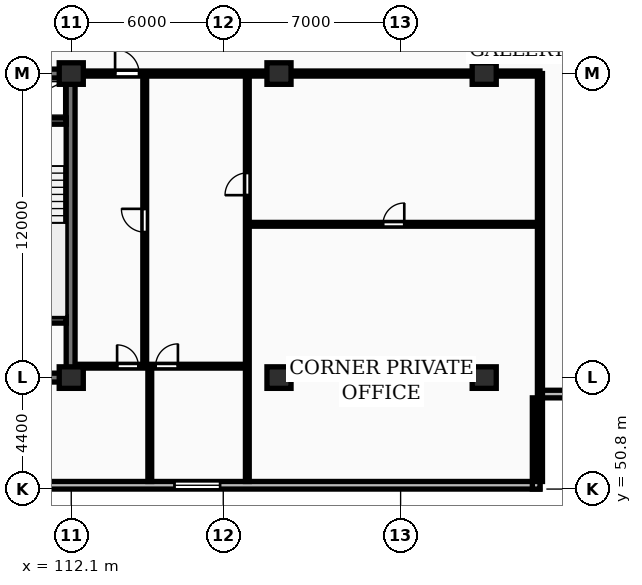
"""IFC4 building model, lengths in metres.
Left out: names, types, materials, properties, quantities, classifications, styles, units other than length and angle.
Written with IfcOpenShell. Run it as: python <this file> out.ifc"""

import sys

from ifc_helpers import new_model, si_unit, direction, frame, frame_2d, origin, origin_2d, place, context, subcontext, project, spatial, rectangle, extrude, element, fill, save


model = new_model("IFC4")
c1 = context("Model", 3, precision=1e-05, world=origin(), true_north=direction((0.0, 1.0)))
c2 = subcontext(c1, "Body", "Model", "MODEL_VIEW")
j1 = project(units=[si_unit("LENGTHUNIT", "METRE"), si_unit("PLANEANGLEUNIT", "RADIAN")], contexts=[c1])
p1 = place(None, origin())
s1 = spatial("IfcSite", under=j1, at=p1, CompositionType="ELEMENT")
p2 = place(p1, origin())
s2 = spatial("IfcBuilding", under=s1, at=p2, CompositionType="ELEMENT")
p3 = place(p2, frame((0.0, 0.0, 113.3)))
s3 = spatial("IfcBuildingStorey", under=s2, at=p3, CompositionType="ELEMENT", Elevation=113.3)
for number, where, z_axis, x_axis in (
    (1, (112.1, 55.2, 0.0), (0.0, 0.0, 1.0), (1.0, 0.0, 0.0)),
    (2, (112.1, 67.2, 0.0), (0.0, 0.0, 1.0), (1.0, 0.0, 0.0)),
    (3, (120.3, 55.2, 0.0), (0.0, 0.0, 1.0), (1.0, 0.0, 0.0)),
    (4, (120.3, 67.2, 0.0), (0.0, 0.0, 1.0), (1.0, 0.0, 0.0)),
    (5, (128.4, 55.2, 0.0), (0.0, 0.0, 1.0), (1.0, 0.0, 0.0)),
    (6, (128.4, 67.2, 0.0), (0.0, 0.0, 1.0), (1.0, 0.0, 0.0)),
):
    element("IfcColumn", number, at=place(p3, frame(where, z_axis=z_axis, x_axis=x_axis)), inside=s3, PredefinedType="COLUMN", context=c2, shape_type="SweptSolid", body=[
        extrude(rectangle(XDim=0.95, YDim=0.85, at=origin_2d()), origin(), (0.0, 0.0, 1.0), 3.25),
    ])
p4 = place(p3, frame((57.6, 50.95, 0.0), z_axis=(0.0, 0.0, 1.0), x_axis=(1.0, 0.0, 0.0)))
e7 = element("IfcWall", 7, at=p4, inside=s3, PredefinedType="STANDARD", context=c2, shape_type="SweptSolid", body=[
    extrude(rectangle(XDim=73.0, YDim=0.3, at=frame_2d((36.5, 0.0))), origin(), (0.0, 0.0, 1.0), 2.97),
])
p5 = place(p4, frame((15.225, 0.0, 0.85)))
e8 = element("IfcOpeningElement", 8, at=p5, cuts=e7, PredefinedType="OPENING", context=c2, shape_type="SweptSolid", body=[
    extrude(rectangle(XDim=1.8, YDim=1.8, at=frame_2d((0.9, 0.9))), frame((0.0, 0.16, 0.0), z_axis=(0.0, -1.0, 0.0), x_axis=(1.0, 0.0, 0.0)), (0.0, 0.0, 1.0), 0.32),
])
p6 = place(p4, frame((58.575, 0.0, 0.85)))
e9 = element("IfcOpeningElement", 9, at=p6, cuts=e7, PredefinedType="OPENING", context=c2, shape_type="SweptSolid", body=[
    extrude(rectangle(XDim=1.8, YDim=1.8, at=frame_2d((0.9, 0.9))), frame((0.0, 0.16, 0.0), z_axis=(0.0, -1.0, 0.0), x_axis=(1.0, 0.0, 0.0)), (0.0, 0.0, 1.0), 0.32),
])
for number, where, z_axis, x_axis in (
    (10, (130.45, 50.8, 0.0), (0.0, 0.0, 1.0), (0.0, 1.0, 0.0)),
    (11, (130.6, 54.55, 0.0), (0.0, 0.0, 1.0), (1.0, 0.0, 0.0)),
):
    element("IfcWall", number, at=place(p3, frame(where, z_axis=z_axis, x_axis=x_axis)), inside=s3, PredefinedType="STANDARD", context=c2, shape_type="SweptSolid", body=[
        extrude(rectangle(XDim=3.6, YDim=0.3, at=frame_2d((1.8, 0.0))), origin(), (0.0, 0.0, 1.0), 2.97),
    ])
p7 = place(p3, frame((75.95, 55.2, 0.0), z_axis=(0.0, 0.0, 1.0), x_axis=(1.0, 0.0, 0.0)))
e12 = element("IfcWall", 12, at=p7, inside=s3, PredefinedType="SHEAR", context=c2, shape_type="SweptSolid", body=[
    extrude(rectangle(XDim=36.3, YDim=0.35, at=frame_2d((18.15, 0.0))), origin(), (0.0, 0.0, 1.0), 3.25),
])
p8 = place(p3, frame((112.075, 55.375, 0.0), z_axis=(0.0, 0.0, 1.0), x_axis=(0.0, 1.0, 0.0)))
e13 = element("IfcWall", 13, at=p8, inside=s3, PredefinedType="SHEAR", context=c2, shape_type="SweptSolid", body=[
    extrude(rectangle(XDim=11.65, YDim=0.35, at=frame_2d((5.825, 0.0))), origin(), (0.0, 0.0, 1.0), 3.25),
])
p9 = place(p3, frame((75.95, 67.2, 0.0), z_axis=(0.0, 0.0, 1.0), x_axis=(1.0, 0.0, 0.0)))
e14 = element("IfcWall", 14, at=p9, inside=s3, PredefinedType="SHEAR", context=c2, shape_type="SweptSolid", body=[
    extrude(rectangle(XDim=36.3, YDim=0.35, at=frame_2d((18.15, 0.0))), origin(), (0.0, 0.0, 1.0), 3.25),
])
p10 = place(p9, frame((5.25, 0.0, 0.0)))
e15 = element("IfcOpeningElement", 15, at=p10, cuts=e14, PredefinedType="OPENING", context=c2, shape_type="SweptSolid", body=[
    extrude(rectangle(XDim=1.0, YDim=2.15, at=frame_2d((0.5, 1.075))), frame((0.0, 0.185, 0.0), z_axis=(0.0, -1.0, 0.0), x_axis=(1.0, 0.0, 0.0)), (0.0, 0.0, 1.0), 0.37),
])
p11 = place(p9, frame((21.6, 0.0, 0.0)))
e16 = element("IfcOpeningElement", 16, at=p11, cuts=e14, PredefinedType="OPENING", context=c2, shape_type="SweptSolid", body=[
    extrude(rectangle(XDim=1.5, YDim=2.2, at=frame_2d((0.75, 1.1))), frame((0.0, 0.185, 0.0), z_axis=(0.0, -1.0, 0.0), x_axis=(1.0, 0.0, 0.0)), (0.0, 0.0, 1.0), 0.37),
])
p12 = place(p9, frame((30.45, 0.0, 0.0)))
e17 = element("IfcOpeningElement", 17, at=p12, cuts=e14, PredefinedType="OPENING", context=c2, shape_type="SweptSolid", body=[
    extrude(rectangle(XDim=1.0, YDim=2.15, at=frame_2d((0.5, 1.075))), frame((0.0, 0.185, 0.0), z_axis=(0.0, -1.0, 0.0), x_axis=(1.0, 0.0, 0.0)), (0.0, 0.0, 1.0), 0.37),
])
for number, where, z_axis, x_axis in (
    (18, (108.66, 57.475, 0.0), (0.0, 0.0, 1.0), (1.0, 0.0, 0.0)),
    (19, (108.66, 65.325, 0.0), (0.0, 0.0, 1.0), (1.0, 0.0, 0.0)),
):
    element("IfcWall", number, at=place(p3, frame(where, z_axis=z_axis, x_axis=x_axis)), inside=s3, PredefinedType="SHEAR", context=c2, shape_type="SweptSolid", body=[
        extrude(rectangle(XDim=3.24, YDim=0.25, at=frame_2d((1.62, 0.0))), origin(), (0.0, 0.0, 1.0), 3.25),
    ])
p13 = place(p3, frame((130.6, 51.1, 0.0), z_axis=(0.0, 0.0, 1.0), x_axis=(0.0, 1.0, 0.0)))
e20 = element("IfcWall", 20, at=p13, inside=s3, PredefinedType="PARTITIONING", context=c2, shape_type="SweptSolid", body=[
    extrude(rectangle(XDim=16.1, YDim=0.2, at=frame_2d((8.05, 0.0))), origin(), (0.0, 0.0, 1.0), 2.97),
])
p14 = place(p3, frame((119.05, 61.25, 0.0), z_axis=(0.0, 0.0, 1.0), x_axis=(1.0, 0.0, 0.0)))
e21 = element("IfcWall", 21, at=p14, inside=s3, PredefinedType="PARTITIONING", context=c2, shape_type="SweptSolid", body=[
    extrude(rectangle(XDim=11.55, YDim=0.15, at=frame_2d((5.775, 0.0))), origin(), (0.0, 0.0, 1.0), 2.97),
])
p15 = place(p14, frame((5.355, 0.0, 0.0)))
e22 = element("IfcOpeningElement", 22, at=p15, cuts=e21, PredefinedType="OPENING", context=c2, shape_type="SweptSolid", body=[
    extrude(rectangle(XDim=0.84, YDim=2.04, at=frame_2d((0.42, 1.02))), frame((0.0, 0.085, 0.0), z_axis=(0.0, -1.0, 0.0), x_axis=(1.0, 0.0, 0.0)), (0.0, 0.0, 1.0), 0.17),
])
p16 = place(p3, frame((119.05, 51.1, 0.0), z_axis=(0.0, 0.0, 1.0), x_axis=(0.0, 1.0, 0.0)))
e23 = element("IfcWall", 23, at=p16, inside=s3, PredefinedType="PARTITIONING", context=c2, shape_type="SweptSolid", body=[
    extrude(rectangle(XDim=16.05, YDim=0.15, at=frame_2d((8.025, 0.0))), origin(), (0.0, 0.0, 1.0), 2.97),
])
p17 = place(p16, frame((11.3, 0.0, 0.0)))
e24 = element("IfcOpeningElement", 24, at=p17, cuts=e23, PredefinedType="OPENING", context=c2, shape_type="SweptSolid", body=[
    extrude(rectangle(XDim=0.88, YDim=2.06, at=frame_2d((0.44, 1.03))), frame((0.0, 0.085, 0.0), z_axis=(0.0, -1.0, 0.0), x_axis=(1.0, 0.0, 0.0)), (0.0, 0.0, 1.0), 0.17),
])
p18 = place(p3, frame((115.0, 55.65, 0.0), z_axis=(0.0, 0.0, 1.0), x_axis=(0.0, 1.0, 0.0)))
e25 = element("IfcWall", 25, at=p18, inside=s3, PredefinedType="PARTITIONING", context=c2, shape_type="SweptSolid", body=[
    extrude(rectangle(XDim=11.5, YDim=0.15, at=frame_2d((5.75, 0.0))), origin(), (0.0, 0.0, 1.0), 2.97),
])
p19 = place(p18, frame((5.29, 0.0, 0.0)))
e26 = element("IfcOpeningElement", 26, at=p19, cuts=e25, PredefinedType="OPENING", context=c2, shape_type="SweptSolid", body=[
    extrude(rectangle(XDim=0.92, YDim=2.08, at=frame_2d((0.46, 1.04))), frame((0.0, 0.085, 0.0), z_axis=(0.0, -1.0, 0.0), x_axis=(1.0, 0.0, 0.0)), (0.0, 0.0, 1.0), 0.17),
])
p20 = place(p3, frame((115.2, 51.1, 0.0), z_axis=(0.0, 0.0, 1.0), x_axis=(0.0, 1.0, 0.0)))
e27 = element("IfcWall", 27, at=p20, inside=s3, PredefinedType="PARTITIONING", context=c2, shape_type="SweptSolid", body=[
    extrude(rectangle(XDim=4.55, YDim=0.15, at=frame_2d((2.275, 0.0))), origin(), (0.0, 0.0, 1.0), 2.97),
])
p21 = place(p3, frame((112.27, 55.65, 0.0), z_axis=(0.0, 0.0, 1.0), x_axis=(1.0, 0.0, 0.0)))
e28 = element("IfcWall", 28, at=p21, inside=s3, PredefinedType="PARTITIONING", context=c2, shape_type="SweptSolid", body=[
    extrude(rectangle(XDim=6.76, YDim=0.15, at=frame_2d((3.38, 0.0))), origin(), (0.0, 0.0, 1.0), 2.97),
])
p22 = place(p21, frame((1.64, 0.0, 0.0)))
e29 = element("IfcOpeningElement", 29, at=p22, cuts=e28, PredefinedType="OPENING", context=c2, shape_type="SweptSolid", body=[
    extrude(rectangle(XDim=0.84, YDim=2.04, at=frame_2d((0.42, 1.02))), frame((0.0, 0.085, 0.0), z_axis=(0.0, -1.0, 0.0), x_axis=(1.0, 0.0, 0.0)), (0.0, 0.0, 1.0), 0.17),
])
p23 = place(p21, frame((3.16, 0.0, 0.0)))
e30 = element("IfcOpeningElement", 30, at=p23, cuts=e28, PredefinedType="OPENING", context=c2, shape_type="SweptSolid", body=[
    extrude(rectangle(XDim=0.88, YDim=2.06, at=frame_2d((0.44, 1.03))), frame((0.0, 0.085, 0.0), z_axis=(0.0, -1.0, 0.0), x_axis=(1.0, 0.0, 0.0)), (0.0, 0.0, 1.0), 0.17),
])
p24 = place(p3, frame((112.25, 67.2, 0.0), z_axis=(0.0, 0.0, 1.0), x_axis=(1.0, 0.0, 0.0)))
e31 = element("IfcWall", 31, at=p24, inside=s3, PredefinedType="PARTITIONING", context=c2, shape_type="SweptSolid", body=[
    extrude(rectangle(XDim=18.35, YDim=0.2, at=frame_2d((9.175, 0.0))), origin(), (0.0, 0.0, 1.0), 2.433),
])
p25 = place(p24, frame((1.58, 0.0, 0.0)))
e32 = element("IfcOpeningElement", 32, at=p25, cuts=e31, PredefinedType="OPENING", context=c2, shape_type="SweptSolid", body=[
    extrude(rectangle(XDim=0.95, YDim=2.15, at=frame_2d((0.475, 1.075))), frame((0.0, 0.11, 0.0), z_axis=(0.0, -1.0, 0.0), x_axis=(1.0, 0.0, 0.0)), (0.0, 0.0, 1.0), 0.22),
])
p26 = place(p6, origin())
e33 = element("IfcWindow", 33, at=p26, inside=s3, PartitioningType="SINGLE_PANEL", PredefinedType="WINDOW", context=c2, shape_type="SweptSolid", body=[
    extrude(rectangle(XDim=1.8, YDim=1.8, at=frame_2d((0.9, 0.9))), frame((0.0, 0.03, 0.0), z_axis=(0.0, -1.0, 0.0), x_axis=(1.0, 0.0, 0.0)), (0.0, 0.0, 1.0), 0.06),
])
fill(e9, e33)
p27 = place(p15, origin())
e34 = element("IfcDoor", 34, at=p27, inside=s3, OperationType="SINGLE_SWING_RIGHT", PredefinedType="DOOR", context=c2, shape_type="SweptSolid", body=[
    extrude(rectangle(XDim=0.84, YDim=2.04, at=frame_2d((0.42, 1.02))), frame((0.0, 0.025, 0.0), z_axis=(0.0, -1.0, 0.0), x_axis=(1.0, 0.0, 0.0)), (0.0, 0.0, 1.0), 0.05),
])
fill(e22, e34)
p28 = place(p17, origin())
e35 = element("IfcDoor", 35, at=p28, inside=s3, OperationType="SINGLE_SWING_LEFT", PredefinedType="DOOR", context=c2, shape_type="SweptSolid", body=[
    extrude(rectangle(XDim=0.88, YDim=2.06, at=frame_2d((0.44, 1.03))), frame((0.0, 0.025, 0.0), z_axis=(0.0, -1.0, 0.0), x_axis=(1.0, 0.0, 0.0)), (0.0, 0.0, 1.0), 0.05),
])
fill(e24, e35)
p29 = place(p19, origin())
e36 = element("IfcDoor", 36, at=p29, inside=s3, OperationType="SINGLE_SWING_RIGHT", PredefinedType="DOOR", context=c2, shape_type="SweptSolid", body=[
    extrude(rectangle(XDim=0.92, YDim=2.08, at=frame_2d((0.46, 1.04))), frame((0.0, 0.025, 0.0), z_axis=(0.0, -1.0, 0.0), x_axis=(1.0, 0.0, 0.0)), (0.0, 0.0, 1.0), 0.05),
])
fill(e26, e36)
p30 = place(p22, origin())
e37 = element("IfcDoor", 37, at=p30, inside=s3, OperationType="SINGLE_SWING_LEFT", PredefinedType="DOOR", context=c2, shape_type="SweptSolid", body=[
    extrude(rectangle(XDim=0.84, YDim=2.04, at=frame_2d((0.42, 1.02))), frame((0.0, 0.025, 0.0), z_axis=(0.0, -1.0, 0.0), x_axis=(1.0, 0.0, 0.0)), (0.0, 0.0, 1.0), 0.05),
])
fill(e29, e37)
p31 = place(p23, origin())
e38 = element("IfcDoor", 38, at=p31, inside=s3, OperationType="SINGLE_SWING_RIGHT", PredefinedType="DOOR", context=c2, shape_type="SweptSolid", body=[
    extrude(rectangle(XDim=0.88, YDim=2.06, at=frame_2d((0.44, 1.03))), frame((0.0, 0.025, 0.0), z_axis=(0.0, -1.0, 0.0), x_axis=(1.0, 0.0, 0.0)), (0.0, 0.0, 1.0), 0.05),
])
fill(e30, e38)
p32 = place(p25, origin())
e39 = element("IfcDoor", 39, at=p32, inside=s3, OperationType="SINGLE_SWING_LEFT", PredefinedType="DOOR", context=c2, shape_type="SweptSolid", body=[
    extrude(rectangle(XDim=0.95, YDim=2.15, at=frame_2d((0.475, 1.075))), frame((0.0, 0.025, 0.0), z_axis=(0.0, -1.0, 0.0), x_axis=(1.0, 0.0, 0.0)), (0.0, 0.0, 1.0), 0.05),
])
fill(e32, e39)
save(model, sys.argv[1])
